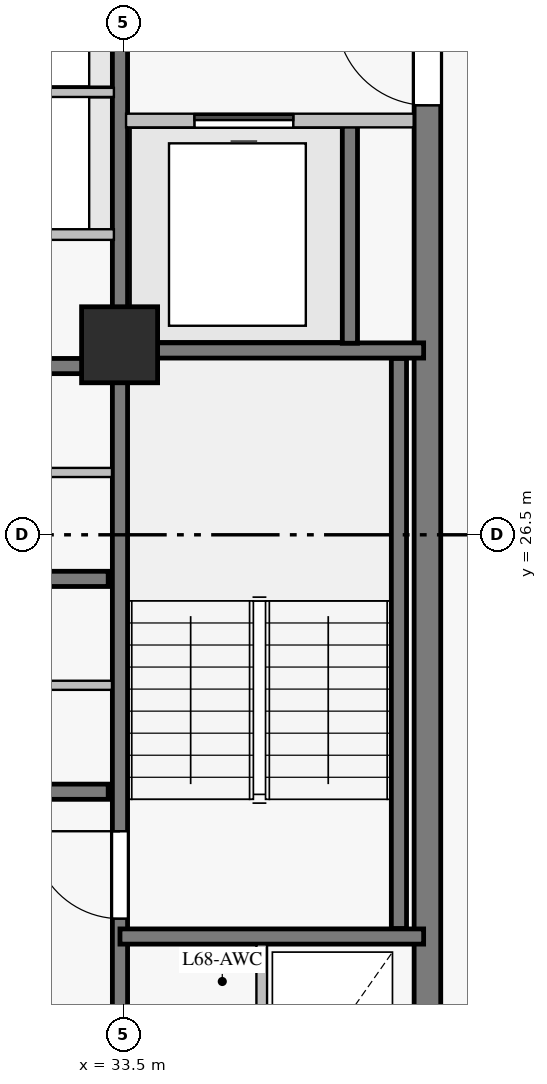
"""IFC4 building model, lengths in metres.
Left out: names, types, materials, properties, quantities, classifications, styles, units other than length and angle.
Written with IfcOpenShell. Run it as: python <this file> out.ifc"""

import sys

from ifc_helpers import new_model, si_unit, direction, frame, frame_2d, origin, origin_with_axes, origin_2d, place, context, subcontext, project, spatial, rectangle, extrude, source, transform, mapped, element, fill, save


model = new_model("IFC4")
c1 = context("Model", 3, precision=1e-05, world=origin(), true_north=direction((0.0, 1.0)))
c2 = subcontext(c1, "Body", "Model", "MODEL_VIEW")
j1 = project(units=[si_unit("LENGTHUNIT", "METRE"), si_unit("PLANEANGLEUNIT", "RADIAN")], contexts=[c1])
p1 = place(None, origin())
s1 = spatial("IfcSite", under=j1, at=p1, CompositionType="ELEMENT")
p2 = place(p1, origin())
s2 = spatial("IfcBuilding", under=s1, at=p2, CompositionType="ELEMENT")
p3 = place(p2, frame((0.0, 0.0, 232.15)))
s3 = spatial("IfcBuildingStorey", under=s2, at=p3, CompositionType="ELEMENT", Elevation=232.15)
p4 = place(p3, frame((37.5, 18.3, 0.0), z_axis=(0.0, 0.0, 1.0), x_axis=(0.0, 1.0, 0.0)))
e1 = element("IfcWall", 1, at=p4, inside=s3, PredefinedType="SHEAR", context=c2, shape_type="SweptSolid", body=[
    extrude(rectangle(XDim=16.4, YDim=0.35, at=frame_2d((8.2, 0.0))), origin(), (0.0, 0.0, 1.0), 2.85),
])
p5 = place(p4, frame((13.85, 0.0, 0.0)))
e2 = element("IfcOpeningElement", 2, at=p5, cuts=e1, PredefinedType="OPENING", context=c2, shape_type="SweptSolid", body=[
    extrude(rectangle(XDim=1.2, YDim=2.15, at=frame_2d((0.6, 1.075))), frame((0.0, 0.185, 0.0), z_axis=(0.0, -1.0, 0.0), x_axis=(1.0, 0.0, 0.0)), (0.0, 0.0, 1.0), 0.37),
])
m1 = source(origin_with_axes(), c2, "Body", "SweptSolid", [
    extrude(rectangle(XDim=1.0, YDim=1.0, at=origin_2d()), origin(), (0.0, 0.0, 1.0), 3.05),
])
p6 = place(p3, frame((33.45, 29.0, 0.0), z_axis=(0.0, 0.0, 1.0), x_axis=(1.0, 0.0, 0.0)))
e3 = element("IfcColumn", 3, at=p6, inside=s3, PredefinedType="COLUMN", context=c2, shape_type="MappedRepresentation", body=[
    mapped(m1, transform((0.0, 0.0, 0.0), scale=1.0)),
])
p7 = place(p3, frame((34.218, 7.533, 0.0), z_axis=(0.0, 0.0, 1.0), x_axis=(0.674833312229, 0.737970189578, 0.0)))
e4 = element("IfcWall", 4, at=p7, inside=s3, PredefinedType="SOLIDWALL", context=c2, shape_type="SweptSolid", body=[
    extrude(rectangle(XDim=18.963, YDim=0.28, at=frame_2d((9.481, 0.0))), origin(), (0.0, 0.0, 1.0), 2.52),
])
p8 = place(p7, frame((5.091, 0.0, 0.85)))
e5 = element("IfcOpeningElement", 5, at=p8, cuts=e4, PredefinedType="OPENING", context=c2, shape_type="SweptSolid", body=[
    extrude(rectangle(XDim=0.95, YDim=1.5, at=frame_2d((0.475, 0.75))), frame((0.0, 0.15, 0.0), z_axis=(0.0, -1.0, 0.0), x_axis=(1.0, 0.0, 0.0)), (0.0, 0.0, 1.0), 0.3),
])
p9 = place(p7, frame((13.928, 0.0, 0.85)))
e6 = element("IfcOpeningElement", 6, at=p9, cuts=e4, PredefinedType="OPENING", context=c2, shape_type="SweptSolid", body=[
    extrude(rectangle(XDim=0.95, YDim=1.5, at=frame_2d((0.475, 0.75))), frame((0.0, 0.15, 0.0), z_axis=(0.0, -1.0, 0.0), x_axis=(1.0, 0.0, 0.0)), (0.0, 0.0, 1.0), 0.3),
])
p10 = place(p7, frame((3.426, 0.0, 0.0)))
e7 = element("IfcOpeningElement", 7, at=p10, cuts=e4, PredefinedType="OPENING", context=c2, shape_type="SweptSolid", body=[
    extrude(rectangle(XDim=1.05, YDim=2.12, at=frame_2d((0.525, 1.06))), frame((0.0, 0.15, 0.0), z_axis=(0.0, -1.0, 0.0), x_axis=(1.0, 0.0, 0.0)), (0.0, 0.0, 1.0), 0.3),
])
p11 = place(p3, frame((33.455, 18.7, 0.0), z_axis=(0.0, 0.0, 1.0), x_axis=(0.0, 1.0, 0.0)))
e8 = element("IfcWall", 8, at=p11, inside=s3, PredefinedType="SHEAR", context=c2, shape_type="SweptSolid", body=[
    extrude(rectangle(XDim=15.6, YDim=0.2, at=frame_2d((7.8, 0.0))), origin(), (0.0, 0.0, 1.0), 2.85),
])
p12 = place(p11, frame((2.75, 0.0, 0.0)))
e9 = element("IfcOpeningElement", 9, at=p12, cuts=e8, PredefinedType="OPENING", context=c2, shape_type="SweptSolid", body=[
    extrude(rectangle(XDim=1.15, YDim=2.15, at=frame_2d((0.575, 1.075))), frame((0.0, 0.11, 0.0), z_axis=(0.0, -1.0, 0.0), x_axis=(1.0, 0.0, 0.0)), (0.0, 0.0, 1.0), 0.22),
])
p13 = place(p11, frame((0.55, 0.0, 0.0)))
e10 = element("IfcOpeningElement", 10, at=p13, cuts=e8, PredefinedType="OPENING", context=c2, shape_type="SweptSolid", body=[
    extrude(rectangle(XDim=0.94, YDim=2.1, at=frame_2d((0.47, 1.05))), frame((0.0, 0.11, 0.0), z_axis=(0.0, -1.0, 0.0), x_axis=(1.0, 0.0, 0.0)), (0.0, 0.0, 1.0), 0.22),
])
p14 = place(p3, frame((23.7, 23.12, 0.0), z_axis=(0.0, 0.0, 1.0), x_axis=(1.0, 0.0, 0.0)))
e11 = element("IfcWall", 11, at=p14, inside=s3, PredefinedType="SHEAR", context=c2, shape_type="SweptSolid", body=[
    extrude(rectangle(XDim=9.6, YDim=0.2, at=frame_2d((4.8, 0.0))), origin(), (0.0, 0.0, 1.0), 2.85),
])
p15 = place(p14, frame((2.4, 0.0, 0.0)))
e12 = element("IfcOpeningElement", 12, at=p15, cuts=e11, PredefinedType="OPENING", context=c2, shape_type="SweptSolid", body=[
    extrude(rectangle(XDim=1.0, YDim=2.15, at=frame_2d((0.5, 1.075))), frame((0.0, 0.11, 0.0), z_axis=(0.0, -1.0, 0.0), x_axis=(1.0, 0.0, 0.0)), (0.0, 0.0, 1.0), 0.22),
])
p16 = place(p3, frame((23.7, 25.92, 0.0), z_axis=(0.0, 0.0, 1.0), x_axis=(1.0, 0.0, 0.0)))
e13 = element("IfcWall", 13, at=p16, inside=s3, PredefinedType="SHEAR", context=c2, shape_type="SweptSolid", body=[
    extrude(rectangle(XDim=9.6, YDim=0.2, at=frame_2d((4.8, 0.0))), origin(), (0.0, 0.0, 1.0), 2.85),
])
p17 = place(p3, frame((23.7, 28.72, 0.0), z_axis=(0.0, 0.0, 1.0), x_axis=(1.0, 0.0, 0.0)))
e14 = element("IfcWall", 14, at=p17, inside=s3, PredefinedType="SHEAR", context=c2, shape_type="SweptSolid", body=[
    extrude(rectangle(XDim=9.6, YDim=0.2, at=frame_2d((4.8, 0.0))), origin(), (0.0, 0.0, 1.0), 2.85),
])
p18 = place(p17, frame((2.4, 0.0, 0.0)))
e15 = element("IfcOpeningElement", 15, at=p18, cuts=e14, PredefinedType="OPENING", context=c2, shape_type="SweptSolid", body=[
    extrude(rectangle(XDim=1.0, YDim=2.15, at=frame_2d((0.5, 1.075))), frame((0.0, 0.11, 0.0), z_axis=(0.0, -1.0, 0.0), x_axis=(1.0, 0.0, 0.0)), (0.0, 0.0, 1.0), 0.22),
])
p19 = place(p3, frame((37.125, 21.32, 0.0), z_axis=(0.0, 0.0, 1.0), x_axis=(0.0, 1.0, 0.0)))
e16 = element("IfcWall", 16, at=p19, inside=s3, PredefinedType="SHEAR", context=c2, shape_type="SweptSolid", body=[
    extrude(rectangle(XDim=7.5, YDim=0.2, at=frame_2d((3.75, 0.0))), origin(), (0.0, 0.0, 1.0), 2.85),
])
for number, where, z_axis, x_axis in (
    (17, (33.455, 21.215, 0.0), (0.0, 0.0, 1.0), (1.0, 0.0, 0.0)),
    (18, (33.455, 28.925, 0.0), (0.0, 0.0, 1.0), (1.0, 0.0, 0.0)),
):
    element("IfcWall", number, at=place(p3, frame(where, z_axis=z_axis, x_axis=x_axis)), inside=s3, PredefinedType="SHEAR", context=c2, shape_type="SweptSolid", body=[
        extrude(rectangle(XDim=3.995, YDim=0.2, at=frame_2d((1.998, 0.0))), origin(), (0.0, 0.0, 1.0), 2.85),
    ])
p20 = place(p3, frame((36.48, 29.02, 0.0), z_axis=(0.0, 0.0, 1.0), x_axis=(0.0, 1.0, 0.0)))
e19 = element("IfcWall", 19, at=p20, inside=s3, PredefinedType="SHEAR", context=c2, shape_type="SweptSolid", body=[
    extrude(rectangle(XDim=2.86, YDim=0.2, at=frame_2d((1.43, 0.0))), origin(), (0.0, 0.0, 1.0), 2.85),
])
p21 = place(p3, frame((23.652, 24.52, 0.0), z_axis=(0.0, 0.0, 1.0), x_axis=(1.0, 0.0, 0.0)))
e20 = element("IfcWall", 20, at=p21, inside=s3, PredefinedType="PARTITIONING", context=c2, shape_type="SweptSolid", body=[
    extrude(rectangle(XDim=9.698, YDim=0.12, at=frame_2d((4.849, 0.0))), origin(), (0.0, 0.0, 1.0), 2.85),
])
p22 = place(p21, frame((4.2, 0.0, 0.0)))
e21 = element("IfcOpeningElement", 21, at=p22, cuts=e20, PredefinedType="OPENING", context=c2, shape_type="SweptSolid", body=[
    extrude(rectangle(XDim=0.94, YDim=2.1, at=frame_2d((0.47, 1.05))), frame((0.0, 0.07, 0.0), z_axis=(0.0, -1.0, 0.0), x_axis=(1.0, 0.0, 0.0)), (0.0, 0.0, 1.0), 0.14),
])
p23 = place(p3, frame((23.652, 27.32, 0.0), z_axis=(0.0, 0.0, 1.0), x_axis=(1.0, 0.0, 0.0)))
e22 = element("IfcWall", 22, at=p23, inside=s3, PredefinedType="PARTITIONING", context=c2, shape_type="SweptSolid", body=[
    extrude(rectangle(XDim=9.698, YDim=0.12, at=frame_2d((4.849, 0.0))), origin(), (0.0, 0.0, 1.0), 2.85),
])
p24 = place(p23, frame((4.2, 0.0, 0.0)))
e23 = element("IfcOpeningElement", 23, at=p24, cuts=e22, PredefinedType="OPENING", context=c2, shape_type="SweptSolid", body=[
    extrude(rectangle(XDim=0.94, YDim=2.1, at=frame_2d((0.47, 1.05))), frame((0.0, 0.07, 0.0), z_axis=(0.0, -1.0, 0.0), x_axis=(1.0, 0.0, 0.0)), (0.0, 0.0, 1.0), 0.14),
])
p25 = place(p3, frame((33.535, 31.95, 0.0), z_axis=(0.0, 0.0, 1.0), x_axis=(1.0, 0.0, 0.0)))
e24 = element("IfcWall", 24, at=p25, inside=s3, PredefinedType="PARTITIONING", context=c2, shape_type="SweptSolid", body=[
    extrude(rectangle(XDim=3.784, YDim=0.18, at=frame_2d((1.892, 0.0))), origin(), (0.0, 0.0, 1.0), 2.85),
])
p26 = place(p25, frame((0.9, 0.0, 0.0)))
e25 = element("IfcOpeningElement", 25, at=p26, cuts=e24, PredefinedType="OPENING", context=c2, shape_type="SweptSolid", body=[
    extrude(rectangle(XDim=1.3, YDim=2.2, at=frame_2d((0.65, 1.1))), frame((0.0, 0.1, 0.0), z_axis=(0.0, -1.0, 0.0), x_axis=(1.0, 0.0, 0.0)), (0.0, 0.0, 1.0), 0.2),
])
p27 = place(p3, frame((35.32, 18.482, 0.0), z_axis=(0.0, 0.0, 1.0), x_axis=(0.0, 1.0, 0.0)))
e26 = element("IfcWall", 26, at=p27, inside=s3, PredefinedType="PARTITIONING", context=c2, shape_type="SweptSolid", body=[
    extrude(rectangle(XDim=2.629, YDim=0.14, at=frame_2d((1.314, 0.0))), origin(), (0.0, 0.0, 1.0), 2.85),
])
p28 = place(p3, frame((31.3, 30.45, 0.0), z_axis=(0.0, 0.0, 1.0), x_axis=(1.0, 0.0, 0.0)))
e27 = element("IfcWall", 27, at=p28, inside=s3, PredefinedType="PARTITIONING", context=c2, shape_type="SweptSolid", body=[
    extrude(rectangle(XDim=2.075, YDim=0.14, at=frame_2d((1.038, 0.0))), origin(), (0.0, 0.0, 1.0), 2.85),
])
p29 = place(p3, frame((31.3, 32.32, 0.0), z_axis=(0.0, 0.0, 1.0), x_axis=(1.0, 0.0, 0.0)))
e28 = element("IfcWall", 28, at=p29, inside=s3, PredefinedType="PARTITIONING", context=c2, shape_type="SweptSolid", body=[
    extrude(rectangle(XDim=2.075, YDim=0.12, at=frame_2d((1.038, 0.0))), origin(), (0.0, 0.0, 1.0), 2.85),
])
m2 = source(origin_with_axes(), c2, "Body", "SweptSolid", [
    extrude(rectangle(XDim=1.15, YDim=2.15, at=frame_2d((0.575, 1.075))), frame((0.0, 0.025, 0.0), z_axis=(0.0, -1.0, 0.0), x_axis=(1.0, 0.0, 0.0)), (0.0, 0.0, 1.0), 0.05),
])
p30 = place(p12, origin())
e29 = element("IfcDoor", 29, at=p30, inside=s3, OperationType="SINGLE_SWING_RIGHT", PredefinedType="DOOR", context=c2, shape_type="MappedRepresentation", body=[
    mapped(m2, transform((0.0, 0.0, 0.0), scale=1.0)),
])
fill(e9, e29)
m3 = source(origin_with_axes(), c2, "Body", "SweptSolid", [
    extrude(rectangle(XDim=1.2, YDim=2.15, at=frame_2d((0.6, 1.075))), frame((0.0, 0.025, 0.0), z_axis=(0.0, -1.0, 0.0), x_axis=(1.0, 0.0, 0.0)), (0.0, 0.0, 1.0), 0.05),
])
p31 = place(p5, origin())
e30 = element("IfcDoor", 30, at=p31, inside=s3, OperationType="SINGLE_SWING_RIGHT", PredefinedType="DOOR", context=c2, shape_type="MappedRepresentation", body=[
    mapped(m3, transform((0.0, 0.0, 0.0), scale=1.0)),
])
fill(e2, e30)
m4 = source(origin_with_axes(), c2, "Body", "SweptSolid", [
    extrude(rectangle(XDim=1.3, YDim=2.2, at=frame_2d((0.65, 1.1))), frame((0.0, 0.025, 0.0), z_axis=(0.0, -1.0, 0.0), x_axis=(1.0, 0.0, 0.0)), (0.0, 0.0, 1.0), 0.05),
])
p32 = place(p26, origin())
e31 = element("IfcDoor", 31, at=p32, inside=s3, OperationType="SLIDING_TO_LEFT", PredefinedType="DOOR", context=c2, shape_type="MappedRepresentation", body=[
    mapped(m4, transform((0.0, 0.0, 0.0), scale=1.0)),
])
fill(e25, e31)
save(model, sys.argv[1])
